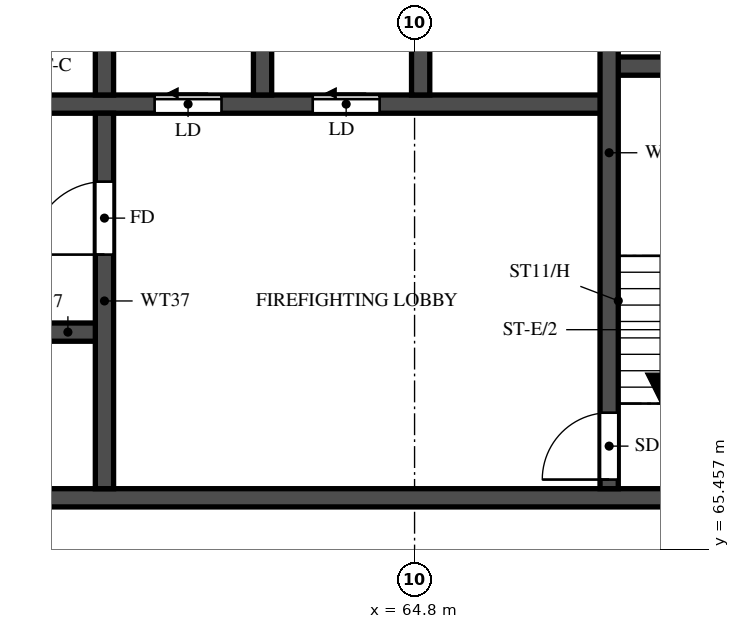
"""IFC4 building model, lengths in metres.
Left out: names, types, materials, properties, quantities, classifications, styles, units other than length and angle.
Written with IfcOpenShell. Run it as: python <this file> out.ifc"""

import sys

from ifc_helpers import new_model, si_unit, direction, frame, frame_2d, origin, place, context, subcontext, project, spatial, rectangle, extrude, element, fill, save


model = new_model("IFC4")
c1 = context("Model", 3, precision=1e-05, world=origin(), true_north=direction((0.0, 1.0)))
c2 = subcontext(c1, "Body", "Model", "MODEL_VIEW")
j1 = project(units=[si_unit("LENGTHUNIT", "METRE"), si_unit("PLANEANGLEUNIT", "RADIAN")], contexts=[c1])
p1 = place(None, origin())
s1 = spatial("IfcSite", under=j1, at=p1, CompositionType="ELEMENT")
p2 = place(p1, origin())
s2 = spatial("IfcBuilding", under=s1, at=p2, CompositionType="ELEMENT")
p3 = place(p2, frame((0.0, 0.0, 250.0)))
s3 = spatial("IfcBuildingStorey", under=s2, at=p3, CompositionType="ELEMENT", Elevation=250.0)
p4 = place(p3, frame((29.2, 66.3, 0.0), z_axis=(0.0, 0.0, 1.0), x_axis=(1.0, 0.0, 0.0)))
e1 = element("IfcWall", 1, at=p4, inside=s3, PredefinedType="SHEAR", context=c2, shape_type="SweptSolid", body=[
    extrude(rectangle(XDim=42.4, YDim=0.3, at=frame_2d((21.2, 0.0))), origin(), (0.0, 0.0, 1.0), 3.22),
])
p5 = place(p4, frame((1.425, 0.0, 0.0)))
e2 = element("IfcOpeningElement", 2, at=p5, cuts=e1, PredefinedType="OPENING", context=c2, shape_type="SweptSolid", body=[
    extrude(rectangle(XDim=1.1, YDim=2.1, at=frame_2d((0.55, 1.05))), frame((0.0, 0.16, 0.0), z_axis=(0.0, -1.0, 0.0), x_axis=(1.0, 0.0, 0.0)), (0.0, 0.0, 1.0), 0.32),
])
p6 = place(p4, frame((4.2, 0.0, 0.0)))
e3 = element("IfcOpeningElement", 3, at=p6, cuts=e1, PredefinedType="OPENING", context=c2, shape_type="SweptSolid", body=[
    extrude(rectangle(XDim=1.8, YDim=2.1, at=frame_2d((0.9, 1.05))), frame((0.0, 0.16, 0.0), z_axis=(0.0, -1.0, 0.0), x_axis=(1.0, 0.0, 0.0)), (0.0, 0.0, 1.0), 0.32),
])
p7 = place(p3, frame((35.65, 69.025, 0.0), z_axis=(0.0, 0.0, 1.0), x_axis=(1.0, 0.0, 0.0)))
e4 = element("IfcWall", 4, at=p7, inside=s3, PredefinedType="SHEAR", context=c2, shape_type="SweptSolid", body=[
    extrude(rectangle(XDim=24.05, YDim=0.3, at=frame_2d((12.025, 0.0))), origin(), (0.0, 0.0, 1.0), 3.22),
])
p8 = place(p7, frame((0.975, 0.0, 0.0)))
e5 = element("IfcOpeningElement", 5, at=p8, cuts=e4, PredefinedType="OPENING", context=c2, shape_type="SweptSolid", body=[
    extrude(rectangle(XDim=1.1, YDim=2.1, at=frame_2d((0.55, 1.05))), frame((0.0, 0.16, 0.0), z_axis=(0.0, -1.0, 0.0), x_axis=(1.0, 0.0, 0.0)), (0.0, 0.0, 1.0), 0.32),
])
p9 = place(p7, frame((3.725, 0.0, 0.0)))
e6 = element("IfcOpeningElement", 6, at=p9, cuts=e4, PredefinedType="OPENING", context=c2, shape_type="SweptSolid", body=[
    extrude(rectangle(XDim=1.1, YDim=2.1, at=frame_2d((0.55, 1.05))), frame((0.0, 0.16, 0.0), z_axis=(0.0, -1.0, 0.0), x_axis=(1.0, 0.0, 0.0)), (0.0, 0.0, 1.0), 0.32),
])
p10 = place(p7, frame((6.475, 0.0, 0.0)))
e7 = element("IfcOpeningElement", 7, at=p10, cuts=e4, PredefinedType="OPENING", context=c2, shape_type="SweptSolid", body=[
    extrude(rectangle(XDim=1.1, YDim=2.1, at=frame_2d((0.55, 1.05))), frame((0.0, 0.16, 0.0), z_axis=(0.0, -1.0, 0.0), x_axis=(1.0, 0.0, 0.0)), (0.0, 0.0, 1.0), 0.32),
])
p11 = place(p7, frame((9.225, 0.0, 0.0)))
e8 = element("IfcOpeningElement", 8, at=p11, cuts=e4, PredefinedType="OPENING", context=c2, shape_type="SweptSolid", body=[
    extrude(rectangle(XDim=1.1, YDim=2.1, at=frame_2d((0.55, 1.05))), frame((0.0, 0.16, 0.0), z_axis=(0.0, -1.0, 0.0), x_axis=(1.0, 0.0, 0.0)), (0.0, 0.0, 1.0), 0.32),
])
p12 = place(p7, frame((11.975, 0.0, 0.0)))
e9 = element("IfcOpeningElement", 9, at=p12, cuts=e4, PredefinedType="OPENING", context=c2, shape_type="SweptSolid", body=[
    extrude(rectangle(XDim=1.1, YDim=2.1, at=frame_2d((0.55, 1.05))), frame((0.0, 0.16, 0.0), z_axis=(0.0, -1.0, 0.0), x_axis=(1.0, 0.0, 0.0)), (0.0, 0.0, 1.0), 0.32),
])
p13 = place(p7, frame((14.725, 0.0, 0.0)))
e10 = element("IfcOpeningElement", 10, at=p13, cuts=e4, PredefinedType="OPENING", context=c2, shape_type="SweptSolid", body=[
    extrude(rectangle(XDim=1.1, YDim=2.1, at=frame_2d((0.55, 1.05))), frame((0.0, 0.16, 0.0), z_axis=(0.0, -1.0, 0.0), x_axis=(1.0, 0.0, 0.0)), (0.0, 0.0, 1.0), 0.32),
])
p14 = place(p7, frame((17.6, 0.0, 0.0)))
e11 = element("IfcOpeningElement", 11, at=p14, cuts=e4, PredefinedType="OPENING", context=c2, shape_type="SweptSolid", body=[
    extrude(rectangle(XDim=1.1, YDim=2.1, at=frame_2d((0.55, 1.05))), frame((0.0, 0.16, 0.0), z_axis=(0.0, -1.0, 0.0), x_axis=(1.0, 0.0, 0.0)), (0.0, 0.0, 1.0), 0.32),
])
p15 = place(p7, frame((20.6, 0.0, 0.0)))
e12 = element("IfcOpeningElement", 12, at=p15, cuts=e4, PredefinedType="OPENING", context=c2, shape_type="SweptSolid", body=[
    extrude(rectangle(XDim=1.1, YDim=2.1, at=frame_2d((0.55, 1.05))), frame((0.0, 0.16, 0.0), z_axis=(0.0, -1.0, 0.0), x_axis=(1.0, 0.0, 0.0)), (0.0, 0.0, 1.0), 0.32),
])
p16 = place(p3, frame((32.8, 72.775, 0.0), z_axis=(0.0, 0.0, 1.0), x_axis=(1.0, 0.0, 0.0)))
e13 = element("IfcWall", 13, at=p16, inside=s3, PredefinedType="SHEAR", context=c2, shape_type="SweptSolid", body=[
    extrude(rectangle(XDim=35.2, YDim=0.3, at=frame_2d((17.6, 0.0))), origin(), (0.0, 0.0, 1.0), 3.22),
])
p17 = place(p16, frame((19.8, 0.0, 0.0)))
e14 = element("IfcOpeningElement", 14, at=p17, cuts=e13, PredefinedType="OPENING", context=c2, shape_type="SweptSolid", body=[
    extrude(rectangle(XDim=1.1, YDim=2.1, at=frame_2d((0.55, 1.05))), frame((0.0, 0.16, 0.0), z_axis=(0.0, -1.0, 0.0), x_axis=(1.0, 0.0, 0.0)), (0.0, 0.0, 1.0), 0.32),
])
p18 = place(p16, frame((27.725, 0.0, 0.0)))
e15 = element("IfcOpeningElement", 15, at=p18, cuts=e13, PredefinedType="OPENING", context=c2, shape_type="SweptSolid", body=[
    extrude(rectangle(XDim=1.1, YDim=2.1, at=frame_2d((0.55, 1.05))), frame((0.0, 0.16, 0.0), z_axis=(0.0, -1.0, 0.0), x_axis=(1.0, 0.0, 0.0)), (0.0, 0.0, 1.0), 0.32),
])
p19 = place(p16, frame((30.325, 0.0, 0.0)))
e16 = element("IfcOpeningElement", 16, at=p19, cuts=e13, PredefinedType="OPENING", context=c2, shape_type="SweptSolid", body=[
    extrude(rectangle(XDim=1.1, YDim=2.1, at=frame_2d((0.55, 1.05))), frame((0.0, 0.16, 0.0), z_axis=(0.0, -1.0, 0.0), x_axis=(1.0, 0.0, 0.0)), (0.0, 0.0, 1.0), 0.32),
])
p20 = place(p16, frame((3.825, 0.0, 0.0)))
e17 = element("IfcOpeningElement", 17, at=p20, cuts=e13, PredefinedType="OPENING", context=c2, shape_type="SweptSolid", body=[
    extrude(rectangle(XDim=1.1, YDim=2.1, at=frame_2d((0.55, 1.05))), frame((0.0, 0.16, 0.0), z_axis=(0.0, -1.0, 0.0), x_axis=(1.0, 0.0, 0.0)), (0.0, 0.0, 1.0), 0.32),
])
p21 = place(p16, frame((6.575, 0.0, 0.0)))
e18 = element("IfcOpeningElement", 18, at=p21, cuts=e13, PredefinedType="OPENING", context=c2, shape_type="SweptSolid", body=[
    extrude(rectangle(XDim=1.1, YDim=2.1, at=frame_2d((0.55, 1.05))), frame((0.0, 0.16, 0.0), z_axis=(0.0, -1.0, 0.0), x_axis=(1.0, 0.0, 0.0)), (0.0, 0.0, 1.0), 0.32),
])
p22 = place(p16, frame((9.325, 0.0, 0.0)))
e19 = element("IfcOpeningElement", 19, at=p22, cuts=e13, PredefinedType="OPENING", context=c2, shape_type="SweptSolid", body=[
    extrude(rectangle(XDim=1.1, YDim=2.1, at=frame_2d((0.55, 1.05))), frame((0.0, 0.16, 0.0), z_axis=(0.0, -1.0, 0.0), x_axis=(1.0, 0.0, 0.0)), (0.0, 0.0, 1.0), 0.32),
])
p23 = place(p16, frame((12.075, 0.0, 0.0)))
e20 = element("IfcOpeningElement", 20, at=p23, cuts=e13, PredefinedType="OPENING", context=c2, shape_type="SweptSolid", body=[
    extrude(rectangle(XDim=1.1, YDim=2.1, at=frame_2d((0.55, 1.05))), frame((0.0, 0.16, 0.0), z_axis=(0.0, -1.0, 0.0), x_axis=(1.0, 0.0, 0.0)), (0.0, 0.0, 1.0), 0.32),
])
p24 = place(p16, frame((14.825, 0.0, 0.0)))
e21 = element("IfcOpeningElement", 21, at=p24, cuts=e13, PredefinedType="OPENING", context=c2, shape_type="SweptSolid", body=[
    extrude(rectangle(XDim=1.1, YDim=2.1, at=frame_2d((0.55, 1.05))), frame((0.0, 0.16, 0.0), z_axis=(0.0, -1.0, 0.0), x_axis=(1.0, 0.0, 0.0)), (0.0, 0.0, 1.0), 0.32),
])
p25 = place(p16, frame((17.575, 0.0, 0.0)))
e22 = element("IfcOpeningElement", 22, at=p25, cuts=e13, PredefinedType="OPENING", context=c2, shape_type="SweptSolid", body=[
    extrude(rectangle(XDim=1.1, YDim=2.1, at=frame_2d((0.55, 1.05))), frame((0.0, 0.16, 0.0), z_axis=(0.0, -1.0, 0.0), x_axis=(1.0, 0.0, 0.0)), (0.0, 0.0, 1.0), 0.32),
])
p26 = place(p16, frame((0.95, 0.0, 0.0)))
e23 = element("IfcOpeningElement", 23, at=p26, cuts=e13, PredefinedType="OPENING", context=c2, shape_type="SweptSolid", body=[
    extrude(rectangle(XDim=1.1, YDim=2.1, at=frame_2d((0.55, 1.05))), frame((0.0, 0.16, 0.0), z_axis=(0.0, -1.0, 0.0), x_axis=(1.0, 0.0, 0.0)), (0.0, 0.0, 1.0), 0.32),
])
p27 = place(p3, frame((68.0, 73.4, 0.0), z_axis=(0.0, 0.0, 1.0), x_axis=(1.0, 0.0, 0.0)))
e24 = element("IfcWall", 24, at=p27, inside=s3, PredefinedType="SHEAR", context=c2, shape_type="SweptSolid", body=[
    extrude(rectangle(XDim=3.1, YDim=0.3, at=frame_2d((1.55, 0.0))), origin(), (0.0, 0.0, 1.0), 3.22),
])
p28 = place(p3, frame((68.0, 66.45, 0.0), z_axis=(0.0, 0.0, 1.0), x_axis=(0.0, 1.0, 0.0)))
e25 = element("IfcWall", 25, at=p28, inside=s3, PredefinedType="SHEAR", context=c2, shape_type="SweptSolid", body=[
    extrude(rectangle(XDim=11.05, YDim=0.3, at=frame_2d((5.525, 0.0))), origin(), (0.0, 0.0, 1.0), 3.22),
])
p29 = place(p28, frame((0.15, 0.0, 0.0)))
e26 = element("IfcOpeningElement", 26, at=p29, cuts=e25, PredefinedType="OPENING", context=c2, shape_type="SweptSolid", body=[
    extrude(rectangle(XDim=1.1, YDim=2.1, at=frame_2d((0.55, 1.05))), frame((0.0, 0.16, 0.0), z_axis=(0.0, -1.0, 0.0), x_axis=(1.0, 0.0, 0.0)), (0.0, 0.0, 1.0), 0.32),
])
p30 = place(p3, frame((59.7, 66.45, 0.0), z_axis=(0.0, 0.0, 1.0), x_axis=(0.0, 1.0, 0.0)))
e27 = element("IfcWall", 27, at=p30, inside=s3, PredefinedType="SHEAR", context=c2, shape_type="SweptSolid", body=[
    extrude(rectangle(XDim=6.175, YDim=0.3, at=frame_2d((3.087, 0.0))), origin(), (0.0, 0.0, 1.0), 3.22),
])
p31 = place(p30, frame((3.85, 0.0, 0.0)))
e28 = element("IfcOpeningElement", 28, at=p31, cuts=e27, PredefinedType="OPENING", context=c2, shape_type="SweptSolid", body=[
    extrude(rectangle(XDim=1.2, YDim=2.1, at=frame_2d((0.6, 1.05))), frame((0.0, 0.16, 0.0), z_axis=(0.0, -1.0, 0.0), x_axis=(1.0, 0.0, 0.0)), (0.0, 0.0, 1.0), 0.32),
])
for number, where, z_axis, x_axis in (
    (29, (59.7, 72.925, 0.0), (0.0, 0.0, 1.0), (0.0, 1.0, 0.0)),
    (30, (62.3, 72.925, 0.0), (0.0, 0.0, 1.0), (0.0, 1.0, 0.0)),
    (31, (64.9, 72.925, 0.0), (0.0, 0.0, 1.0), (0.0, 1.0, 0.0)),
):
    element("IfcWall", number, at=place(p3, frame(where, z_axis=z_axis, x_axis=x_axis)), inside=s3, PredefinedType="SHEAR", context=c2, shape_type="SweptSolid", body=[
        extrude(rectangle(XDim=2.95, YDim=0.3, at=frame_2d((1.475, 0.0))), origin(), (0.0, 0.0, 1.0), 3.22),
    ])
p32 = place(p29, origin())
e32 = element("IfcDoor", 32, at=p32, inside=s3, OperationType="SINGLE_SWING_RIGHT", PredefinedType="DOOR", context=c2, shape_type="SweptSolid", body=[
    extrude(rectangle(XDim=1.1, YDim=2.1, at=frame_2d((0.55, 1.05))), frame((0.0, 0.025, 0.0), z_axis=(0.0, -1.0, 0.0), x_axis=(1.0, 0.0, 0.0)), (0.0, 0.0, 1.0), 0.05),
])
fill(e26, e32)
p33 = place(p31, origin())
e33 = element("IfcDoor", 33, at=p33, inside=s3, OperationType="SINGLE_SWING_LEFT", PredefinedType="DOOR", context=c2, shape_type="SweptSolid", body=[
    extrude(rectangle(XDim=1.2, YDim=2.1, at=frame_2d((0.6, 1.05))), frame((0.0, 0.025, 0.0), z_axis=(0.0, -1.0, 0.0), x_axis=(1.0, 0.0, 0.0)), (0.0, 0.0, 1.0), 0.05),
])
fill(e28, e33)
p34 = place(p18, origin())
e34 = element("IfcDoor", 34, at=p34, inside=s3, OperationType="SLIDING_TO_LEFT", PredefinedType="DOOR", context=c2, shape_type="SweptSolid", body=[
    extrude(rectangle(XDim=1.1, YDim=2.1, at=frame_2d((0.55, 1.05))), frame((0.0, 0.025, 0.0), z_axis=(0.0, -1.0, 0.0), x_axis=(1.0, 0.0, 0.0)), (0.0, 0.0, 1.0), 0.05),
])
fill(e15, e34)
p35 = place(p19, origin())
e35 = element("IfcDoor", 35, at=p35, inside=s3, OperationType="SLIDING_TO_LEFT", PredefinedType="DOOR", context=c2, shape_type="SweptSolid", body=[
    extrude(rectangle(XDim=1.1, YDim=2.1, at=frame_2d((0.55, 1.05))), frame((0.0, 0.025, 0.0), z_axis=(0.0, -1.0, 0.0), x_axis=(1.0, 0.0, 0.0)), (0.0, 0.0, 1.0), 0.05),
])
fill(e16, e35)
save(model, sys.argv[1])
